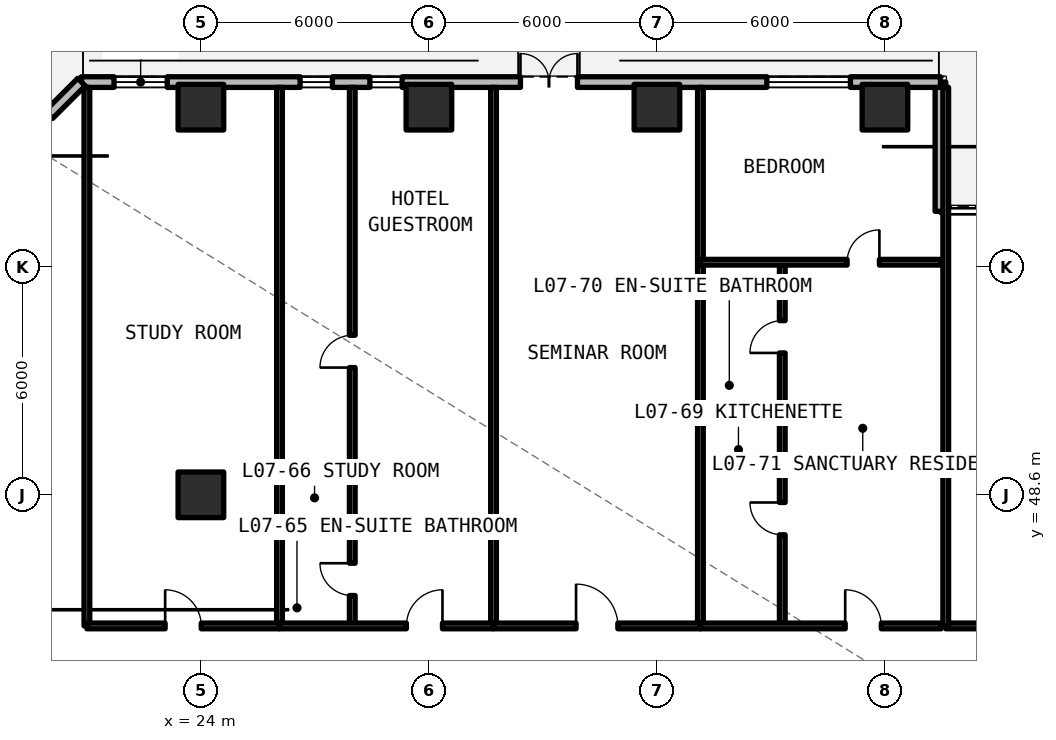
"""IFC4 building model, lengths in metres.
Left out: names, types, materials, properties, quantities, classifications, styles, units other than length and angle.
Written with IfcOpenShell. Run it as: python <this file> out.ifc"""

import sys

from ifc_helpers import new_model, si_unit, direction, frame, frame_2d, origin, origin_2d, place, context, subcontext, project, spatial, rectangle, extrude, element, fill, save


model = new_model("IFC4")
c1 = context("Model", 3, precision=1e-05, world=origin(), true_north=direction((0.0, 1.0)))
c2 = subcontext(c1, "Body", "Model", "MODEL_VIEW")
j1 = project(units=[si_unit("LENGTHUNIT", "METRE"), si_unit("PLANEANGLEUNIT", "RADIAN")], contexts=[c1])
p1 = place(None, origin())
s1 = spatial("IfcSite", under=j1, at=p1, CompositionType="ELEMENT")
p2 = place(p1, origin())
s2 = spatial("IfcBuilding", under=s1, at=p2, CompositionType="ELEMENT")
p3 = place(p2, frame((0.0, 0.0, 29.04)))
s3 = spatial("IfcBuildingStorey", under=s2, at=p3, CompositionType="ELEMENT", Elevation=29.04)
p4 = place(p3, frame((24.0, 48.6, 0.0), z_axis=(0.0, 0.0, 1.0), x_axis=(1.0, 0.0, 0.0)))
e1 = element("IfcColumn", 1, at=p4, inside=s3, PredefinedType="COLUMN", context=c2, shape_type="SweptSolid", body=[
    extrude(rectangle(XDim=1.2, YDim=1.2, at=origin_2d()), origin(), (0.0, 0.0, 1.0), 3.3),
])
for number, where, z_axis, x_axis in (
    (2, (24.0, 58.8, -0.24), (0.0, 0.0, 1.0), (1.0, 0.0, 0.0)),
    (3, (30.0, 58.8, -0.24), (0.0, 0.0, 1.0), (1.0, 0.0, 0.0)),
    (4, (36.0, 58.8, -0.24), (0.0, 0.0, 1.0), (1.0, 0.0, 0.0)),
    (5, (42.0, 58.8, -0.24), (0.0, 0.0, 1.0), (1.0, 0.0, 0.0)),
):
    element("IfcColumn", number, at=place(p3, frame(where, z_axis=z_axis, x_axis=x_axis)), inside=s3, PredefinedType="COLUMN", context=c2, shape_type="SweptSolid", body=[
        extrude(rectangle(XDim=1.2, YDim=1.2, at=origin_2d()), origin(), (0.0, 0.0, 1.0), 3.54),
    ])
p5 = place(p3, frame((43.46, 56.06, 0.0), z_axis=(0.0, 0.0, 1.0), x_axis=(0.0, 1.0, 0.0)))
e6 = element("IfcWall", 6, at=p5, inside=s3, PredefinedType="SOLIDWALL", context=c2, shape_type="SweptSolid", body=[
    extrude(rectangle(XDim=3.4, YDim=0.28, at=frame_2d((1.7, 0.0))), origin(), (0.0, 0.0, 1.0), 3.08),
])
p6 = place(p3, frame((43.46, 59.46, 0.0), z_axis=(0.0, 0.0, 1.0), x_axis=(-1.0, 0.0, 0.0)))
e7 = element("IfcWall", 7, at=p6, inside=s3, PredefinedType="SOLIDWALL", context=c2, shape_type="SweptSolid", body=[
    extrude(rectangle(XDim=22.602, YDim=0.28, at=frame_2d((11.301, 0.0))), origin(), (0.0, 0.0, 1.0), 3.08),
])
p7 = place(p6, frame((9.551, 0.0, 0.0)))
e8 = element("IfcOpeningElement", 8, at=p7, cuts=e7, PredefinedType="OPENING", context=c2, shape_type="SweptSolid", body=[
    extrude(rectangle(XDim=1.5, YDim=2.2, at=frame_2d((0.75, 1.1))), frame((0.0, 0.15, 0.0), z_axis=(0.0, -1.0, 0.0), x_axis=(1.0, 0.0, 0.0)), (0.0, 0.0, 1.0), 0.3),
])
p8 = place(p6, frame((20.346, 0.0, 0.78)))
e9 = element("IfcOpeningElement", 9, at=p8, cuts=e7, PredefinedType="OPENING", context=c2, shape_type="SweptSolid", body=[
    extrude(rectangle(XDim=1.4, YDim=1.65, at=frame_2d((0.7, 0.825))), frame((0.0, 0.15, 0.0), z_axis=(0.0, -1.0, 0.0), x_axis=(1.0, 0.0, 0.0)), (0.0, 0.0, 1.0), 0.3),
])
p9 = place(p6, frame((15.999, 0.0, 0.78)))
e10 = element("IfcOpeningElement", 10, at=p9, cuts=e7, PredefinedType="OPENING", context=c2, shape_type="SweptSolid", body=[
    extrude(rectangle(XDim=0.85, YDim=1.65, at=frame_2d((0.425, 0.825))), frame((0.0, 0.15, 0.0), z_axis=(0.0, -1.0, 0.0), x_axis=(1.0, 0.0, 0.0)), (0.0, 0.0, 1.0), 0.3),
])
p10 = place(p6, frame((14.163, 0.0, 0.78)))
e11 = element("IfcOpeningElement", 11, at=p10, cuts=e7, PredefinedType="OPENING", context=c2, shape_type="SweptSolid", body=[
    extrude(rectangle(XDim=0.85, YDim=1.65, at=frame_2d((0.425, 0.825))), frame((0.0, 0.15, 0.0), z_axis=(0.0, -1.0, 0.0), x_axis=(1.0, 0.0, 0.0)), (0.0, 0.0, 1.0), 0.3),
])
p11 = place(p6, frame((2.368, 0.0, 0.78)))
e12 = element("IfcOpeningElement", 12, at=p11, cuts=e7, PredefinedType="OPENING", context=c2, shape_type="SweptSolid", body=[
    extrude(rectangle(XDim=2.2, YDim=1.66, at=frame_2d((1.1, 0.83))), frame((0.0, 0.15, 0.0), z_axis=(0.0, -1.0, 0.0), x_axis=(1.0, 0.0, 0.0)), (0.0, 0.0, 1.0), 0.3),
])
p12 = place(p3, frame((20.858, 59.46, 0.0), z_axis=(0.0, 0.0, 1.0), x_axis=(-0.707106781187, -0.707106781187, 0.0)))
e13 = element("IfcWall", 13, at=p12, inside=s3, PredefinedType="SOLIDWALL", context=c2, shape_type="SweptSolid", body=[
    extrude(rectangle(XDim=5.824, YDim=0.28, at=frame_2d((2.912, 0.0))), origin(), (0.0, 0.0, 1.0), 3.08),
])
p13 = place(p12, frame((1.212, 0.0, 0.78)))
e14 = element("IfcOpeningElement", 14, at=p13, cuts=e13, PredefinedType="OPENING", context=c2, shape_type="SweptSolid", body=[
    extrude(rectangle(XDim=3.4, YDim=1.66, at=frame_2d((1.7, 0.83))), frame((0.0, 0.15, 0.0), z_axis=(0.0, -1.0, 0.0), x_axis=(1.0, 0.0, 0.0)), (0.0, 0.0, 1.0), 0.3),
])
p14 = place(p3, frame((43.6, 45.15, 0.0), z_axis=(0.0, 0.0, 1.0), x_axis=(1.0, 0.0, 0.0)))
e15 = element("IfcWall", 15, at=p14, inside=s3, PredefinedType="SOLIDWALL", context=c2, shape_type="SweptSolid", body=[
    extrude(rectangle(XDim=8.4, YDim=0.15, at=frame_2d((4.2, 0.0))), origin(), (0.0, 0.0, 1.0), 2.35),
])
p15 = place(p14, frame((3.65, 0.0, 0.0)))
e16 = element("IfcOpeningElement", 16, at=p15, cuts=e15, PredefinedType="OPENING", context=c2, shape_type="SweptSolid", body=[
    extrude(rectangle(XDim=1.1, YDim=2.15, at=frame_2d((0.55, 1.075))), frame((0.0, 0.085, 0.0), z_axis=(0.0, -1.0, 0.0), x_axis=(1.0, 0.0, 0.0)), (0.0, 0.0, 1.0), 0.17),
])
for number, where, z_axis, x_axis in (
    (17, (43.6, 45.15, 0.0), (0.0, 0.0, 1.0), (0.0, 1.0, 0.0)),
    (18, (21.0, 45.15, 0.0), (0.0, 0.0, 1.0), (0.0, 1.0, 0.0)),
    (19, (26.069, 45.15, 0.0), (0.0, 0.0, 1.0), (0.0, 1.0, 0.0)),
):
    element("IfcWall", number, at=place(p3, frame(where, z_axis=z_axis, x_axis=x_axis)), inside=s3, PredefinedType="SOLIDWALL", context=c2, shape_type="SweptSolid", body=[
        extrude(rectangle(XDim=14.17, YDim=0.15, at=frame_2d((7.085, 0.0))), origin(), (0.0, 0.0, 1.0), 2.35),
    ])
p16 = place(p3, frame((21.0, 45.15, 0.0), z_axis=(0.0, 0.0, 1.0), x_axis=(1.0, 0.0, 0.0)))
e20 = element("IfcWall", 20, at=p16, inside=s3, PredefinedType="SOLIDWALL", context=c2, shape_type="SweptSolid", body=[
    extrude(rectangle(XDim=5.069, YDim=0.15, at=frame_2d((2.534, 0.0))), origin(), (0.0, 0.0, 1.0), 2.35),
])
p17 = place(p16, frame((2.059, 0.0, 0.0)))
e21 = element("IfcOpeningElement", 21, at=p17, cuts=e20, PredefinedType="OPENING", context=c2, shape_type="SweptSolid", body=[
    extrude(rectangle(XDim=0.95, YDim=2.15, at=frame_2d((0.475, 1.075))), frame((0.0, 0.085, 0.0), z_axis=(0.0, -1.0, 0.0), x_axis=(1.0, 0.0, 0.0)), (0.0, 0.0, 1.0), 0.17),
])
p18 = place(p3, frame((31.7, 45.15, 0.0), z_axis=(0.0, 0.0, 1.0), x_axis=(0.0, 1.0, 0.0)))
e22 = element("IfcWall", 22, at=p18, inside=s3, PredefinedType="SOLIDWALL", context=c2, shape_type="SweptSolid", body=[
    extrude(rectangle(XDim=14.17, YDim=0.15, at=frame_2d((7.085, 0.0))), origin(), (0.0, 0.0, 1.0), 2.35),
])
p19 = place(p3, frame((26.069, 47.6, 0.0), z_axis=(0.0, 0.0, 1.0), x_axis=(1.0, 0.0, 0.0)))
e23 = element("IfcWall", 23, at=p19, inside=s3, PredefinedType="PARTITIONING", context=c2, shape_type="SweptSolid", body=[
    extrude(rectangle(XDim=1.915, YDim=0.15, at=frame_2d((0.958, 0.0))), origin(), (0.0, 0.0, 1.0), 2.35),
])
p20 = place(p3, frame((27.983, 45.15, 0.0), z_axis=(0.0, 0.0, 1.0), x_axis=(0.0, 1.0, 0.0)))
e24 = element("IfcWall", 24, at=p20, inside=s3, PredefinedType="PARTITIONING", context=c2, shape_type="SweptSolid", body=[
    extrude(rectangle(XDim=14.17, YDim=0.15, at=frame_2d((7.085, 0.0))), origin(), (0.0, 0.0, 1.0), 2.35),
])
p21 = place(p20, frame((0.8, 0.0, 0.0)))
e25 = element("IfcOpeningElement", 25, at=p21, cuts=e24, PredefinedType="OPENING", context=c2, shape_type="SweptSolid", body=[
    extrude(rectangle(XDim=0.85, YDim=2.1, at=frame_2d((0.425, 1.05))), frame((0.0, 0.085, 0.0), z_axis=(0.0, -1.0, 0.0), x_axis=(1.0, 0.0, 0.0)), (0.0, 0.0, 1.0), 0.17),
])
p22 = place(p20, frame((6.798, 0.0, 0.0)))
e26 = element("IfcOpeningElement", 26, at=p22, cuts=e24, PredefinedType="OPENING", context=c2, shape_type="SweptSolid", body=[
    extrude(rectangle(XDim=0.85, YDim=2.1, at=frame_2d((0.425, 1.05))), frame((0.0, 0.085, 0.0), z_axis=(0.0, -1.0, 0.0), x_axis=(1.0, 0.0, 0.0)), (0.0, 0.0, 1.0), 0.17),
])
p23 = place(p3, frame((26.069, 45.15, 0.0), z_axis=(0.0, 0.0, 1.0), x_axis=(1.0, 0.0, 0.0)))
e27 = element("IfcWall", 27, at=p23, inside=s3, PredefinedType="SOLIDWALL", context=c2, shape_type="SweptSolid", body=[
    extrude(rectangle(XDim=5.632, YDim=0.15, at=frame_2d((2.816, 0.0))), origin(), (0.0, 0.0, 1.0), 2.35),
])
p24 = place(p23, frame((3.338, 0.0, 0.0)))
e28 = element("IfcOpeningElement", 28, at=p24, cuts=e27, PredefinedType="OPENING", context=c2, shape_type="SweptSolid", body=[
    extrude(rectangle(XDim=0.95, YDim=2.15, at=frame_2d((0.475, 1.075))), frame((0.0, 0.085, 0.0), z_axis=(0.0, -1.0, 0.0), x_axis=(1.0, 0.0, 0.0)), (0.0, 0.0, 1.0), 0.17),
])
p25 = place(p3, frame((37.144, 45.15, 0.0), z_axis=(0.0, 0.0, 1.0), x_axis=(0.0, 1.0, 0.0)))
e29 = element("IfcWall", 29, at=p25, inside=s3, PredefinedType="SOLIDWALL", context=c2, shape_type="SweptSolid", body=[
    extrude(rectangle(XDim=14.17, YDim=0.15, at=frame_2d((7.085, 0.0))), origin(), (0.0, 0.0, 1.0), 2.35),
])
p26 = place(p3, frame((31.7, 45.15, 0.0), z_axis=(0.0, 0.0, 1.0), x_axis=(1.0, 0.0, 0.0)))
e30 = element("IfcWall", 30, at=p26, inside=s3, PredefinedType="SOLIDWALL", context=c2, shape_type="SweptSolid", body=[
    extrude(rectangle(XDim=5.444, YDim=0.15, at=frame_2d((2.722, 0.0))), origin(), (0.0, 0.0, 1.0), 2.35),
])
p27 = place(p26, frame((2.172, 0.0, 0.0)))
e31 = element("IfcOpeningElement", 31, at=p27, cuts=e30, PredefinedType="OPENING", context=c2, shape_type="SweptSolid", body=[
    extrude(rectangle(XDim=1.1, YDim=2.15, at=frame_2d((0.55, 1.075))), frame((0.0, 0.085, 0.0), z_axis=(0.0, -1.0, 0.0), x_axis=(1.0, 0.0, 0.0)), (0.0, 0.0, 1.0), 0.17),
])
p28 = place(p3, frame((37.144, 50.796, 0.0), z_axis=(0.0, 0.0, 1.0), x_axis=(1.0, 0.0, 0.0)))
e32 = element("IfcWall", 32, at=p28, inside=s3, PredefinedType="PARTITIONING", context=c2, shape_type="SweptSolid", body=[
    extrude(rectangle(XDim=2.154, YDim=0.15, at=frame_2d((1.077, 0.0))), origin(), (0.0, 0.0, 1.0), 2.35),
])
p29 = place(p3, frame((39.298, 45.15, 0.0), z_axis=(0.0, 0.0, 1.0), x_axis=(0.0, 1.0, 0.0)))
e33 = element("IfcWall", 33, at=p29, inside=s3, PredefinedType="PARTITIONING", context=c2, shape_type="SweptSolid", body=[
    extrude(rectangle(XDim=9.57, YDim=0.15, at=frame_2d((4.785, 0.0))), origin(), (0.0, 0.0, 1.0), 2.35),
])
p30 = place(p29, frame((2.398, 0.0, 0.0)))
e34 = element("IfcOpeningElement", 34, at=p30, cuts=e33, PredefinedType="OPENING", context=c2, shape_type="SweptSolid", body=[
    extrude(rectangle(XDim=0.85, YDim=2.1, at=frame_2d((0.425, 1.05))), frame((0.0, 0.085, 0.0), z_axis=(0.0, -1.0, 0.0), x_axis=(1.0, 0.0, 0.0)), (0.0, 0.0, 1.0), 0.17),
])
p31 = place(p29, frame((7.183, 0.0, 0.0)))
e35 = element("IfcOpeningElement", 35, at=p31, cuts=e33, PredefinedType="OPENING", context=c2, shape_type="SweptSolid", body=[
    extrude(rectangle(XDim=0.85, YDim=2.1, at=frame_2d((0.425, 1.05))), frame((0.0, 0.085, 0.0), z_axis=(0.0, -1.0, 0.0), x_axis=(1.0, 0.0, 0.0)), (0.0, 0.0, 1.0), 0.17),
])
p32 = place(p3, frame((37.144, 54.72, 0.0), z_axis=(0.0, 0.0, 1.0), x_axis=(1.0, 0.0, 0.0)))
e36 = element("IfcWall", 36, at=p32, inside=s3, PredefinedType="PARTITIONING", context=c2, shape_type="SweptSolid", body=[
    extrude(rectangle(XDim=6.336, YDim=0.15, at=frame_2d((3.168, 0.0))), origin(), (0.0, 0.0, 1.0), 2.35),
])
p33 = place(p32, frame((3.86, 0.0, 0.0)))
e37 = element("IfcOpeningElement", 37, at=p33, cuts=e36, PredefinedType="OPENING", context=c2, shape_type="SweptSolid", body=[
    extrude(rectangle(XDim=0.85, YDim=2.1, at=frame_2d((0.425, 1.05))), frame((0.0, 0.085, 0.0), z_axis=(0.0, -1.0, 0.0), x_axis=(1.0, 0.0, 0.0)), (0.0, 0.0, 1.0), 0.17),
])
p34 = place(p3, frame((37.144, 45.15, 0.0), z_axis=(0.0, 0.0, 1.0), x_axis=(1.0, 0.0, 0.0)))
e38 = element("IfcWall", 38, at=p34, inside=s3, PredefinedType="SOLIDWALL", context=c2, shape_type="SweptSolid", body=[
    extrude(rectangle(XDim=6.336, YDim=0.15, at=frame_2d((3.168, 0.0))), origin(), (0.0, 0.0, 1.0), 2.35),
])
p35 = place(p34, frame((3.81, 0.0, 0.0)))
e39 = element("IfcOpeningElement", 39, at=p35, cuts=e38, PredefinedType="OPENING", context=c2, shape_type="SweptSolid", body=[
    extrude(rectangle(XDim=0.95, YDim=2.15, at=frame_2d((0.475, 1.075))), frame((0.0, 0.085, 0.0), z_axis=(0.0, -1.0, 0.0), x_axis=(1.0, 0.0, 0.0)), (0.0, 0.0, 1.0), 0.17),
])
p36 = place(p7, frame((1.5, 0.0, 0.0), z_axis=(0.0, 0.0, 1.0), x_axis=(-1.0, 0.0, 0.0)))
e40 = element("IfcDoor", 40, at=p36, inside=s3, OperationType="SINGLE_SWING_LEFT", PredefinedType="DOOR", context=c2, shape_type="SweptSolid", body=[
    extrude(rectangle(XDim=1.5, YDim=2.2, at=frame_2d((0.75, 1.1))), frame((0.0, 0.025, 0.0), z_axis=(0.0, -1.0, 0.0), x_axis=(1.0, 0.0, 0.0)), (0.0, 0.0, 1.0), 0.05),
])
fill(e8, e40)
p37 = place(p8, origin())
e41 = element("IfcWindow", 41, at=p37, inside=s3, PartitioningType="SINGLE_PANEL", PredefinedType="WINDOW", context=c2, shape_type="SweptSolid", body=[
    extrude(rectangle(XDim=1.4, YDim=1.65, at=frame_2d((0.7, 0.825))), frame((0.0, 0.03, 0.0), z_axis=(0.0, -1.0, 0.0), x_axis=(1.0, 0.0, 0.0)), (0.0, 0.0, 1.0), 0.06),
])
fill(e9, e41)
p38 = place(p9, origin())
e42 = element("IfcWindow", 42, at=p38, inside=s3, PartitioningType="SINGLE_PANEL", PredefinedType="WINDOW", context=c2, shape_type="SweptSolid", body=[
    extrude(rectangle(XDim=0.85, YDim=1.65, at=frame_2d((0.425, 0.825))), frame((0.0, 0.03, 0.0), z_axis=(0.0, -1.0, 0.0), x_axis=(1.0, 0.0, 0.0)), (0.0, 0.0, 1.0), 0.06),
])
fill(e10, e42)
p39 = place(p10, origin())
e43 = element("IfcWindow", 43, at=p39, inside=s3, PartitioningType="SINGLE_PANEL", PredefinedType="WINDOW", context=c2, shape_type="SweptSolid", body=[
    extrude(rectangle(XDim=0.85, YDim=1.65, at=frame_2d((0.425, 0.825))), frame((0.0, 0.03, 0.0), z_axis=(0.0, -1.0, 0.0), x_axis=(1.0, 0.0, 0.0)), (0.0, 0.0, 1.0), 0.06),
])
fill(e11, e43)
p40 = place(p11, origin())
e44 = element("IfcWindow", 44, at=p40, inside=s3, PartitioningType="SINGLE_PANEL", PredefinedType="WINDOW", context=c2, shape_type="SweptSolid", body=[
    extrude(rectangle(XDim=2.2, YDim=1.66, at=frame_2d((1.1, 0.83))), frame((0.0, 0.03, 0.0), z_axis=(0.0, -1.0, 0.0), x_axis=(1.0, 0.0, 0.0)), (0.0, 0.0, 1.0), 0.06),
])
fill(e12, e44)
p41 = place(p17, origin())
e45 = element("IfcDoor", 45, at=p41, inside=s3, OperationType="SINGLE_SWING_LEFT", PredefinedType="DOOR", context=c2, shape_type="SweptSolid", body=[
    extrude(rectangle(XDim=0.95, YDim=2.15, at=frame_2d((0.475, 1.075))), frame((0.0, 0.025, 0.0), z_axis=(0.0, -1.0, 0.0), x_axis=(1.0, 0.0, 0.0)), (0.0, 0.0, 1.0), 0.05),
])
fill(e21, e45)
p42 = place(p21, origin())
e46 = element("IfcDoor", 46, at=p42, inside=s3, OperationType="SINGLE_SWING_RIGHT", PredefinedType="DOOR", context=c2, shape_type="SweptSolid", body=[
    extrude(rectangle(XDim=0.85, YDim=2.1, at=frame_2d((0.425, 1.05))), frame((0.0, 0.025, 0.0), z_axis=(0.0, -1.0, 0.0), x_axis=(1.0, 0.0, 0.0)), (0.0, 0.0, 1.0), 0.05),
])
fill(e25, e46)
p43 = place(p22, origin())
e47 = element("IfcDoor", 47, at=p43, inside=s3, OperationType="SINGLE_SWING_LEFT", PredefinedType="DOOR", context=c2, shape_type="SweptSolid", body=[
    extrude(rectangle(XDim=0.85, YDim=2.1, at=frame_2d((0.425, 1.05))), frame((0.0, 0.025, 0.0), z_axis=(0.0, -1.0, 0.0), x_axis=(1.0, 0.0, 0.0)), (0.0, 0.0, 1.0), 0.05),
])
fill(e26, e47)
p44 = place(p24, origin())
e48 = element("IfcDoor", 48, at=p44, inside=s3, OperationType="SINGLE_SWING_RIGHT", PredefinedType="DOOR", context=c2, shape_type="SweptSolid", body=[
    extrude(rectangle(XDim=0.95, YDim=2.15, at=frame_2d((0.475, 1.075))), frame((0.0, 0.025, 0.0), z_axis=(0.0, -1.0, 0.0), x_axis=(1.0, 0.0, 0.0)), (0.0, 0.0, 1.0), 0.05),
])
fill(e28, e48)
p45 = place(p27, origin())
e49 = element("IfcDoor", 49, at=p45, inside=s3, OperationType="SINGLE_SWING_LEFT", PredefinedType="DOOR", context=c2, shape_type="SweptSolid", body=[
    extrude(rectangle(XDim=1.1, YDim=2.15, at=frame_2d((0.55, 1.075))), frame((0.0, 0.025, 0.0), z_axis=(0.0, -1.0, 0.0), x_axis=(1.0, 0.0, 0.0)), (0.0, 0.0, 1.0), 0.05),
])
fill(e31, e49)
p46 = place(p30, origin())
e50 = element("IfcDoor", 50, at=p46, inside=s3, OperationType="SINGLE_SWING_RIGHT", PredefinedType="DOOR", context=c2, shape_type="SweptSolid", body=[
    extrude(rectangle(XDim=0.85, YDim=2.1, at=frame_2d((0.425, 1.05))), frame((0.0, 0.025, 0.0), z_axis=(0.0, -1.0, 0.0), x_axis=(1.0, 0.0, 0.0)), (0.0, 0.0, 1.0), 0.05),
])
fill(e34, e50)
p47 = place(p31, origin())
e51 = element("IfcDoor", 51, at=p47, inside=s3, OperationType="SINGLE_SWING_LEFT", PredefinedType="DOOR", context=c2, shape_type="SweptSolid", body=[
    extrude(rectangle(XDim=0.85, YDim=2.1, at=frame_2d((0.425, 1.05))), frame((0.0, 0.025, 0.0), z_axis=(0.0, -1.0, 0.0), x_axis=(1.0, 0.0, 0.0)), (0.0, 0.0, 1.0), 0.05),
])
fill(e35, e51)
p48 = place(p33, origin())
e52 = element("IfcDoor", 52, at=p48, inside=s3, OperationType="SINGLE_SWING_RIGHT", PredefinedType="DOOR", context=c2, shape_type="SweptSolid", body=[
    extrude(rectangle(XDim=0.85, YDim=2.1, at=frame_2d((0.425, 1.05))), frame((0.0, 0.025, 0.0), z_axis=(0.0, -1.0, 0.0), x_axis=(1.0, 0.0, 0.0)), (0.0, 0.0, 1.0), 0.05),
])
fill(e37, e52)
p49 = place(p35, origin())
e53 = element("IfcDoor", 53, at=p49, inside=s3, OperationType="SINGLE_SWING_LEFT", PredefinedType="DOOR", context=c2, shape_type="SweptSolid", body=[
    extrude(rectangle(XDim=0.95, YDim=2.15, at=frame_2d((0.475, 1.075))), frame((0.0, 0.025, 0.0), z_axis=(0.0, -1.0, 0.0), x_axis=(1.0, 0.0, 0.0)), (0.0, 0.0, 1.0), 0.05),
])
fill(e39, e53)
save(model, sys.argv[1])
